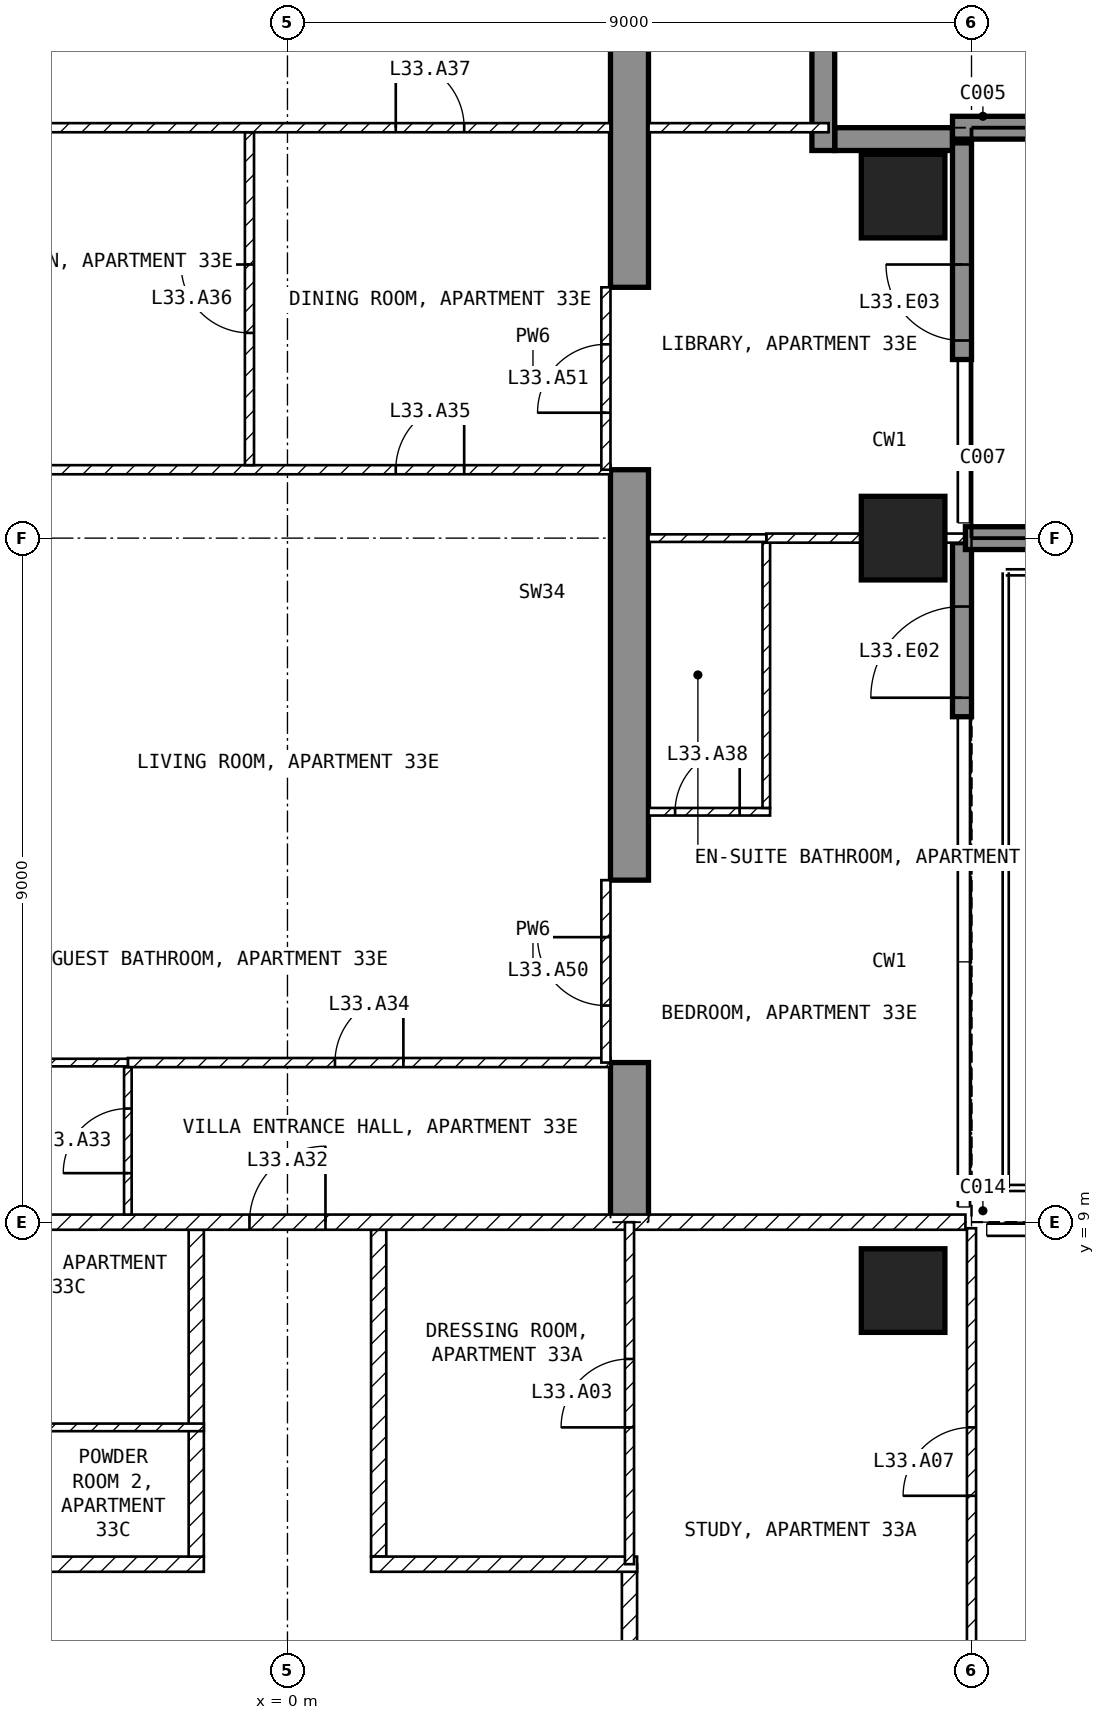
"""IFC4 building model, lengths in metres.
Left out: names, types, materials, properties, quantities, classifications, styles, units other than length and angle.
Written with IfcOpenShell. Run it as: python <this file> out.ifc"""

import sys

from ifc_helpers import new_model, si_unit, direction, frame, frame_2d, origin, origin_2d, place, context, subcontext, project, spatial, polyline, rectangle, outline, extrude, element, fill, save


model = new_model("IFC4")
c1 = context("Model", 3, precision=1e-05, world=origin(), true_north=direction((0.0, 1.0)))
c2 = subcontext(c1, "Body", "Model", "MODEL_VIEW")
j1 = project(units=[si_unit("LENGTHUNIT", "METRE"), si_unit("PLANEANGLEUNIT", "RADIAN")], contexts=[c1])
p1 = place(None, origin())
s1 = spatial("IfcSite", under=j1, at=p1, CompositionType="ELEMENT")
p2 = place(p1, origin())
s2 = spatial("IfcBuilding", under=s1, at=p2, CompositionType="ELEMENT")
p3 = place(p2, frame((0.0, 0.0, 137.4)))
s3 = spatial("IfcBuildingStorey", under=s2, at=p3, CompositionType="ELEMENT", Elevation=137.4)
for number, where, z_axis, x_axis in (
    (1, (8.1, 8.1, -0.25), (0.0, 0.0, 1.0), (1.0, 0.0, 0.0)),
    (2, (8.1, 18.0, -0.25), (0.0, 0.0, 1.0), (1.0, 0.0, 0.0)),
    (3, (8.1, 22.5, -0.25), (0.0, 0.0, 1.0), (1.0, 0.0, 0.0)),
):
    element("IfcColumn", number, at=place(p3, frame(where, z_axis=z_axis, x_axis=x_axis)), inside=s3, PredefinedType="COLUMN", context=c2, shape_type="SweptSolid", body=[
        extrude(rectangle(XDim=1.1, YDim=1.1, at=origin_2d()), origin(), (0.0, 0.0, 1.0), 3.5),
    ])
p4 = place(p3, frame((4.25, 9.0, -0.25), z_axis=(1.0, 0.0, 0.0), x_axis=(0.0, 1.0, 0.0)))
e4 = element("IfcWall", 4, at=p4, inside=s3, PredefinedType="SHEAR", context=c2, shape_type="SweptSolid", body=[
    extrude(outline(polyline([(0.0, 0.0), (2.1, 0.0), (2.1, 2.65), (4.5, 2.65), (4.5, 0.0), (9.9, 0.0), (9.9, 2.65), (12.3, 2.65), (12.3, 0.0), (16.55, 0.0), (16.55, 3.5), (0.0, 3.5), (0.0, 0.0)])), origin(), (0.0, 0.0, 1.0), 0.5),
])
p5 = place(p3, frame((8.875, 15.65, 0.0), z_axis=(0.0, 0.0, 1.0), x_axis=(0.0, 1.0, 0.0)))
e5 = element("IfcWall", 5, at=p5, inside=s3, PredefinedType="SOLIDWALL", context=c2, shape_type="SweptSolid", body=[
    extrude(rectangle(XDim=2.29, YDim=0.25, at=frame_2d((1.145, 0.0))), origin(), (0.0, 0.0, 1.0), 3.25),
])
p6 = place(p5, frame((0.25, 0.0, 0.0)))
e6 = element("IfcOpeningElement", 6, at=p6, cuts=e5, PredefinedType="OPENING", context=c2, shape_type="SweptSolid", body=[
    extrude(rectangle(XDim=1.2, YDim=2.4, at=frame_2d((0.6, 1.2))), frame((0.0, 0.135, 0.0), z_axis=(0.0, -1.0, 0.0), x_axis=(1.0, 0.0, 0.0)), (0.0, 0.0, 1.0), 0.27),
])
p7 = place(p3, frame((8.875, 20.35, 0.0), z_axis=(0.0, 0.0, 1.0), x_axis=(0.0, 1.0, 0.0)))
e7 = element("IfcWall", 7, at=p7, inside=s3, PredefinedType="SOLIDWALL", context=c2, shape_type="SweptSolid", body=[
    extrude(rectangle(XDim=2.85, YDim=0.25, at=frame_2d((1.425, 0.0))), origin(), (0.0, 0.0, 1.0), 3.25),
])
p8 = place(p7, frame((0.25, 0.0, 0.0)))
e8 = element("IfcOpeningElement", 8, at=p8, cuts=e7, PredefinedType="OPENING", context=c2, shape_type="SweptSolid", body=[
    extrude(rectangle(XDim=1.0, YDim=2.4, at=frame_2d((0.5, 1.2))), frame((0.0, 0.135, 0.0), z_axis=(0.0, -1.0, 0.0), x_axis=(1.0, 0.0, 0.0)), (0.0, 0.0, 1.0), 0.27),
])
p9 = place(p3, frame((8.75, 23.25, 0.0), z_axis=(0.0, 0.0, 1.0), x_axis=(-1.0, 0.0, 0.0)))
e9 = element("IfcWall", 9, at=p9, inside=s3, PredefinedType="SOLIDWALL", context=c2, shape_type="SweptSolid", body=[
    extrude(rectangle(XDim=1.55, YDim=0.3, at=frame_2d((0.775, 0.0))), origin(), (0.0, 0.0, 1.0), 3.25),
])
p10 = place(p3, frame((7.05, 23.1, 0.0), z_axis=(0.0, 0.0, 1.0), x_axis=(0.0, 1.0, 0.0)))
e10 = element("IfcWall", 10, at=p10, inside=s3, PredefinedType="SOLIDWALL", context=c2, shape_type="SweptSolid", body=[
    extrude(rectangle(XDim=1.8, YDim=0.3, at=frame_2d((0.9, 0.0))), origin(), (0.0, 0.0, 1.0), 3.25),
])
p11 = place(p3, frame((8.92, 18.0, 0.0), z_axis=(0.0, 0.0, 1.0), x_axis=(1.0, 0.0, 0.0)))
e11 = element("IfcWall", 11, at=p11, inside=s3, PredefinedType="SOLIDWALL", context=c2, shape_type="SweptSolid", body=[
    extrude(rectangle(XDim=2.82, YDim=0.3, at=frame_2d((1.41, 0.0))), origin(), (0.0, 0.0, 1.0), 3.25),
])
p12 = place(p3, frame((8.75, 23.4, 0.0), z_axis=(0.0, 0.0, 1.0), x_axis=(1.0, 0.0, 0.0)))
e12 = element("IfcWall", 12, at=p12, inside=s3, PredefinedType="SOLIDWALL", context=c2, shape_type="SweptSolid", body=[
    extrude(rectangle(XDim=2.95, YDim=0.3, at=frame_2d((1.475, 0.0))), origin(), (0.0, 0.0, 1.0), 3.25),
])
p13 = place(p3, frame((4.5, 4.5, 0.0), z_axis=(0.0, 0.0, 1.0), x_axis=(0.0, -1.0, 0.0)))
e13 = element("IfcWall", 13, at=p13, inside=s3, PredefinedType="PARTITIONING", context=c2, shape_type="SweptSolid", body=[
    extrude(rectangle(XDim=3.2, YDim=0.2, at=frame_2d((1.6, 0.0))), origin(), (0.0, 0.0, 1.0), 3.25),
])
p14 = place(p3, frame((1.2, 8.9, 0.0), z_axis=(0.0, 0.0, 1.0), x_axis=(0.0, -1.0, 0.0)))
e14 = element("IfcWall", 14, at=p14, inside=s3, PredefinedType="PARTITIONING", context=c2, shape_type="SweptSolid", body=[
    extrude(rectangle(XDim=4.3, YDim=0.2, at=frame_2d((2.15, 0.0))), origin(), (0.0, 0.0, 1.0), 3.25),
])
for number, where, z_axis, x_axis in (
    (15, (1.1, 4.5, 0.0), (0.0, 0.0, 1.0), (1.0, 0.0, 0.0)),
    (16, (-4.6, 4.5, 0.0), (0.0, 0.0, 1.0), (1.0, 0.0, 0.0)),
):
    element("IfcWall", number, at=place(p3, frame(where, z_axis=z_axis, x_axis=x_axis)), inside=s3, PredefinedType="PARTITIONING", context=c2, shape_type="SweptSolid", body=[
        extrude(rectangle(XDim=3.5, YDim=0.2, at=frame_2d((1.75, 0.0))), origin(), (0.0, 0.0, 1.0), 3.25),
    ])
p15 = place(p3, frame((-1.2, 4.6, 0.0), z_axis=(0.0, 0.0, 1.0), x_axis=(0.0, 1.0, 0.0)))
e17 = element("IfcWall", 17, at=p15, inside=s3, PredefinedType="PARTITIONING", context=c2, shape_type="SweptSolid", body=[
    extrude(rectangle(XDim=4.3, YDim=0.2, at=frame_2d((2.15, 0.0))), origin(), (0.0, 0.0, 1.0), 3.25),
])
p16 = place(p3, frame((-8.92, 9.0, 0.0), z_axis=(0.0, 0.0, 1.0), x_axis=(1.0, 0.0, 0.0)))
e18 = element("IfcWall", 18, at=p16, inside=s3, PredefinedType="PARTITIONING", context=c2, shape_type="SweptSolid", body=[
    extrude(rectangle(XDim=17.84, YDim=0.2, at=frame_2d((8.92, 0.0))), origin(), (0.0, 0.0, 1.0), 3.25),
])
p17 = place(p16, frame((8.42, 0.0, 0.0)))
e19 = element("IfcOpeningElement", 19, at=p17, cuts=e18, PredefinedType="OPENING", context=c2, shape_type="SweptSolid", body=[
    extrude(rectangle(XDim=1.0, YDim=2.1, at=frame_2d((0.5, 1.05))), frame((0.0, 0.11, 0.0), z_axis=(0.0, -1.0, 0.0), x_axis=(1.0, 0.0, 0.0)), (0.0, 0.0, 1.0), 0.22),
])
p18 = place(p3, frame((9.0, 1.3, 0.0), z_axis=(0.0, 0.0, 1.0), x_axis=(0.0, 1.0, 0.0)))
e20 = element("IfcWall", 20, at=p18, inside=s3, PredefinedType="PARTITIONING", context=c2, shape_type="SweptSolid", body=[
    extrude(rectangle(XDim=7.62, YDim=0.12, at=frame_2d((3.81, 0.0))), origin(), (0.0, 0.0, 1.0), 3.25),
])
p19 = place(p18, frame((4.1, 0.0, 0.0)))
e21 = element("IfcOpeningElement", 21, at=p19, cuts=e20, PredefinedType="OPENING", context=c2, shape_type="SweptSolid", body=[
    extrude(rectangle(XDim=0.9, YDim=2.1, at=frame_2d((0.45, 1.05))), frame((0.0, 0.07, 0.0), z_axis=(0.0, -1.0, 0.0), x_axis=(1.0, 0.0, 0.0)), (0.0, 0.0, 1.0), 0.14),
])
p20 = place(p3, frame((4.5, 4.5, 0.0), z_axis=(0.0, 0.0, 1.0), x_axis=(0.0, 1.0, 0.0)))
e22 = element("IfcWall", 22, at=p20, inside=s3, PredefinedType="PARTITIONING", context=c2, shape_type="SweptSolid", body=[
    extrude(rectangle(XDim=4.5, YDim=0.12, at=frame_2d((2.25, 0.0))), origin(), (0.0, 0.0, 1.0), 3.25),
])
p21 = place(p20, frame((1.8, 0.0, 0.0)))
e23 = element("IfcOpeningElement", 23, at=p21, cuts=e22, PredefinedType="OPENING", context=c2, shape_type="SweptSolid", body=[
    extrude(rectangle(XDim=0.9, YDim=2.1, at=frame_2d((0.45, 1.05))), frame((0.0, 0.07, 0.0), z_axis=(0.0, -1.0, 0.0), x_axis=(1.0, 0.0, 0.0)), (0.0, 0.0, 1.0), 0.14),
])
p22 = place(p3, frame((-4.56, 6.3, 0.0), z_axis=(0.0, 0.0, 1.0), x_axis=(1.0, 0.0, 0.0)))
e24 = element("IfcWall", 24, at=p22, inside=s3, PredefinedType="PARTITIONING", context=c2, shape_type="SweptSolid", body=[
    extrude(rectangle(XDim=3.46, YDim=0.1, at=frame_2d((1.73, 0.0))), origin(), (0.0, 0.0, 1.0), 3.25),
])
p23 = place(p3, frame((-2.1, 9.1, 0.0), z_axis=(0.0, 0.0, 1.0), x_axis=(0.0, 1.0, 0.0)))
e25 = element("IfcWall", 25, at=p23, inside=s3, PredefinedType="PARTITIONING", context=c2, shape_type="SweptSolid", body=[
    extrude(rectangle(XDim=1.94, YDim=0.1, at=frame_2d((0.97, 0.0))), origin(), (0.0, 0.0, 1.0), 3.25),
])
p24 = place(p23, frame((0.545, 0.0, 0.0)))
e26 = element("IfcOpeningElement", 26, at=p24, cuts=e25, PredefinedType="OPENING", context=c2, shape_type="SweptSolid", body=[
    extrude(rectangle(XDim=0.85, YDim=2.1, at=frame_2d((0.425, 1.05))), frame((0.0, 0.06, 0.0), z_axis=(0.0, -1.0, 0.0), x_axis=(1.0, 0.0, 0.0)), (0.0, 0.0, 1.0), 0.12),
])
p25 = place(p3, frame((-2.1, 11.1, 0.0), z_axis=(0.0, 0.0, 1.0), x_axis=(1.0, 0.0, 0.0)))
e27 = element("IfcWall", 27, at=p25, inside=s3, PredefinedType="PARTITIONING", context=c2, shape_type="SweptSolid", body=[
    extrude(rectangle(XDim=6.35, YDim=0.12, at=frame_2d((3.175, 0.0))), origin(), (0.0, 0.0, 1.0), 3.25),
])
p26 = place(p25, frame((2.725, 0.0, 0.0)))
e28 = element("IfcOpeningElement", 28, at=p26, cuts=e27, PredefinedType="OPENING", context=c2, shape_type="SweptSolid", body=[
    extrude(rectangle(XDim=0.9, YDim=2.1, at=frame_2d((0.45, 1.05))), frame((0.0, 0.07, 0.0), z_axis=(0.0, -1.0, 0.0), x_axis=(1.0, 0.0, 0.0)), (0.0, 0.0, 1.0), 0.14),
])
p27 = place(p3, frame((-4.25, 11.1, 0.0), z_axis=(0.0, 0.0, 1.0), x_axis=(1.0, 0.0, 0.0)))
e29 = element("IfcWall", 29, at=p27, inside=s3, PredefinedType="PARTITIONING", context=c2, shape_type="SweptSolid", body=[
    extrude(rectangle(XDim=2.15, YDim=0.1, at=frame_2d((1.075, 0.0))), origin(), (0.0, 0.0, 1.0), 3.25),
])
p28 = place(p3, frame((-4.25, 18.9, 0.0), z_axis=(0.0, 0.0, 1.0), x_axis=(1.0, 0.0, 0.0)))
e30 = element("IfcWall", 30, at=p28, inside=s3, PredefinedType="PARTITIONING", context=c2, shape_type="SweptSolid", body=[
    extrude(rectangle(XDim=8.5, YDim=0.12, at=frame_2d((4.25, 0.0))), origin(), (0.0, 0.0, 1.0), 3.25),
])
p29 = place(p28, frame((5.675, 0.0, 0.0)))
e31 = element("IfcOpeningElement", 31, at=p29, cuts=e30, PredefinedType="OPENING", context=c2, shape_type="SweptSolid", body=[
    extrude(rectangle(XDim=0.9, YDim=2.1, at=frame_2d((0.45, 1.05))), frame((0.0, 0.07, 0.0), z_axis=(0.0, -1.0, 0.0), x_axis=(1.0, 0.0, 0.0)), (0.0, 0.0, 1.0), 0.14),
])
p30 = place(p3, frame((-0.5, 18.96, 0.0), z_axis=(0.0, 0.0, 1.0), x_axis=(0.0, 1.0, 0.0)))
e32 = element("IfcWall", 32, at=p30, inside=s3, PredefinedType="PARTITIONING", context=c2, shape_type="SweptSolid", body=[
    extrude(rectangle(XDim=4.38, YDim=0.12, at=frame_2d((2.19, 0.0))), origin(), (0.0, 0.0, 1.0), 3.25),
])
p31 = place(p30, frame((1.74, 0.0, 0.0)))
e33 = element("IfcOpeningElement", 33, at=p31, cuts=e32, PredefinedType="OPENING", context=c2, shape_type="SweptSolid", body=[
    extrude(rectangle(XDim=0.9, YDim=2.1, at=frame_2d((0.45, 1.05))), frame((0.0, 0.07, 0.0), z_axis=(0.0, -1.0, 0.0), x_axis=(1.0, 0.0, 0.0)), (0.0, 0.0, 1.0), 0.14),
])
p32 = place(p3, frame((-4.25, 23.4, 0.0), z_axis=(0.0, 0.0, 1.0), x_axis=(1.0, 0.0, 0.0)))
e34 = element("IfcWall", 34, at=p32, inside=s3, PredefinedType="PARTITIONING", context=c2, shape_type="SweptSolid", body=[
    extrude(rectangle(XDim=8.5, YDim=0.12, at=frame_2d((4.25, 0.0))), origin(), (0.0, 0.0, 1.0), 3.25),
])
p33 = place(p32, frame((5.675, 0.0, 0.0)))
e35 = element("IfcOpeningElement", 35, at=p33, cuts=e34, PredefinedType="OPENING", context=c2, shape_type="SweptSolid", body=[
    extrude(rectangle(XDim=0.9, YDim=2.1, at=frame_2d((0.45, 1.05))), frame((0.0, 0.07, 0.0), z_axis=(0.0, -1.0, 0.0), x_axis=(1.0, 0.0, 0.0)), (0.0, 0.0, 1.0), 0.14),
])
p34 = place(p3, frame((4.75, 14.4, 0.0), z_axis=(0.0, 0.0, 1.0), x_axis=(1.0, 0.0, 0.0)))
e36 = element("IfcWall", 36, at=p34, inside=s3, PredefinedType="PARTITIONING", context=c2, shape_type="SweptSolid", body=[
    extrude(rectangle(XDim=1.6, YDim=0.1, at=frame_2d((0.8, 0.0))), origin(), (0.0, 0.0, 1.0), 3.25),
])
p35 = place(p34, frame((0.35, 0.0, 0.0)))
e37 = element("IfcOpeningElement", 37, at=p35, cuts=e36, PredefinedType="OPENING", context=c2, shape_type="SweptSolid", body=[
    extrude(rectangle(XDim=0.85, YDim=2.1, at=frame_2d((0.425, 1.05))), frame((0.0, 0.06, 0.0), z_axis=(0.0, -1.0, 0.0), x_axis=(1.0, 0.0, 0.0)), (0.0, 0.0, 1.0), 0.12),
])
p36 = place(p3, frame((6.3, 14.45, 0.0), z_axis=(0.0, 0.0, 1.0), x_axis=(0.0, 1.0, 0.0)))
e38 = element("IfcWall", 38, at=p36, inside=s3, PredefinedType="PARTITIONING", context=c2, shape_type="SweptSolid", body=[
    extrude(rectangle(XDim=3.49, YDim=0.1, at=frame_2d((1.745, 0.0))), origin(), (0.0, 0.0, 1.0), 3.25),
])
p37 = place(p3, frame((6.3, 18.0, 0.0), z_axis=(0.0, 0.0, 1.0), x_axis=(1.0, 0.0, 0.0)))
e39 = element("IfcWall", 39, at=p37, inside=s3, PredefinedType="PARTITIONING", context=c2, shape_type="SweptSolid", body=[
    extrude(rectangle(XDim=2.62, YDim=0.12, at=frame_2d((1.31, 0.0))), origin(), (0.0, 0.0, 1.0), 2.414),
])
p38 = place(p3, frame((4.75, 18.0, 0.0), z_axis=(0.0, 0.0, 1.0), x_axis=(1.0, 0.0, 0.0)))
e40 = element("IfcWall", 40, at=p38, inside=s3, PredefinedType="PARTITIONING", context=c2, shape_type="SweptSolid", body=[
    extrude(rectangle(XDim=1.55, YDim=0.1, at=frame_2d((0.775, 0.0))), origin(), (0.0, 0.0, 1.0), 2.414),
])
p39 = place(p3, frame((4.75, 23.4, 0.0), z_axis=(0.0, 0.0, 1.0), x_axis=(1.0, 0.0, 0.0)))
e41 = element("IfcWall", 41, at=p39, inside=s3, PredefinedType="PARTITIONING", context=c2, shape_type="SweptSolid", body=[
    extrude(rectangle(XDim=2.37, YDim=0.12, at=frame_2d((1.185, 0.0))), origin(), (0.0, 0.0, 1.0), 3.25),
])
p40 = place(p3, frame((4.19, 11.1, 0.0), z_axis=(0.0, 0.0, 1.0), x_axis=(0.0, 1.0, 0.0)))
e42 = element("IfcWall", 42, at=p40, inside=s3, PredefinedType="PARTITIONING", context=c2, shape_type="SweptSolid", body=[
    extrude(rectangle(XDim=2.4, YDim=0.12, at=frame_2d((1.2, 0.0))), origin(), (0.0, 0.0, 1.0), 2.4),
])
p41 = place(p40, frame((0.75, 0.0, 0.0)))
e43 = element("IfcOpeningElement", 43, at=p41, cuts=e42, PredefinedType="OPENING", context=c2, shape_type="SweptSolid", body=[
    extrude(rectangle(XDim=0.9, YDim=2.1, at=frame_2d((0.45, 1.05))), frame((0.0, 0.07, 0.0), z_axis=(0.0, -1.0, 0.0), x_axis=(1.0, 0.0, 0.0)), (0.0, 0.0, 1.0), 0.14),
])
p42 = place(p3, frame((4.19, 18.9, 0.0), z_axis=(0.0, 0.0, 1.0), x_axis=(0.0, 1.0, 0.0)))
e44 = element("IfcWall", 44, at=p42, inside=s3, PredefinedType="PARTITIONING", context=c2, shape_type="SweptSolid", body=[
    extrude(rectangle(XDim=2.4, YDim=0.12, at=frame_2d((1.2, 0.0))), origin(), (0.0, 0.0, 1.0), 2.4),
])
p43 = place(p42, frame((0.75, 0.0, 0.0)))
e45 = element("IfcOpeningElement", 45, at=p43, cuts=e44, PredefinedType="OPENING", context=c2, shape_type="SweptSolid", body=[
    extrude(rectangle(XDim=0.9, YDim=2.1, at=frame_2d((0.45, 1.05))), frame((0.0, 0.07, 0.0), z_axis=(0.0, -1.0, 0.0), x_axis=(1.0, 0.0, 0.0)), (0.0, 0.0, 1.0), 0.14),
])
p44 = place(p6, origin())
e46 = element("IfcDoor", 46, at=p44, inside=s3, OperationType="SINGLE_SWING_LEFT", PredefinedType="DOOR", context=c2, shape_type="SweptSolid", body=[
    extrude(rectangle(XDim=1.2, YDim=2.4, at=frame_2d((0.6, 1.2))), frame((0.0, 0.025, 0.0), z_axis=(0.0, -1.0, 0.0), x_axis=(1.0, 0.0, 0.0)), (0.0, 0.0, 1.0), 0.05),
])
fill(e6, e46)
p45 = place(p8, origin())
e47 = element("IfcDoor", 47, at=p45, inside=s3, OperationType="SINGLE_SWING_RIGHT", PredefinedType="DOOR", context=c2, shape_type="SweptSolid", body=[
    extrude(rectangle(XDim=1.0, YDim=2.4, at=frame_2d((0.5, 1.2))), frame((0.0, 0.025, 0.0), z_axis=(0.0, -1.0, 0.0), x_axis=(1.0, 0.0, 0.0)), (0.0, 0.0, 1.0), 0.05),
])
fill(e8, e47)
p46 = place(p21, origin())
e48 = element("IfcDoor", 48, at=p46, inside=s3, OperationType="SINGLE_SWING_LEFT", PredefinedType="DOOR", context=c2, shape_type="SweptSolid", body=[
    extrude(rectangle(XDim=0.9, YDim=2.1, at=frame_2d((0.45, 1.05))), frame((0.0, 0.025, 0.0), z_axis=(0.0, -1.0, 0.0), x_axis=(1.0, 0.0, 0.0)), (0.0, 0.0, 1.0), 0.05),
])
fill(e23, e48)
p47 = place(p19, origin())
e49 = element("IfcDoor", 49, at=p47, inside=s3, OperationType="SINGLE_SWING_LEFT", PredefinedType="DOOR", context=c2, shape_type="SweptSolid", body=[
    extrude(rectangle(XDim=0.9, YDim=2.1, at=frame_2d((0.45, 1.05))), frame((0.0, 0.025, 0.0), z_axis=(0.0, -1.0, 0.0), x_axis=(1.0, 0.0, 0.0)), (0.0, 0.0, 1.0), 0.05),
])
fill(e21, e49)
p48 = place(p17, origin())
e50 = element("IfcDoor", 50, at=p48, inside=s3, OperationType="SINGLE_SWING_RIGHT", PredefinedType="DOOR", context=c2, shape_type="SweptSolid", body=[
    extrude(rectangle(XDim=1.0, YDim=2.1, at=frame_2d((0.5, 1.05))), frame((0.0, 0.025, 0.0), z_axis=(0.0, -1.0, 0.0), x_axis=(1.0, 0.0, 0.0)), (0.0, 0.0, 1.0), 0.05),
])
fill(e19, e50)
p49 = place(p24, origin())
e51 = element("IfcDoor", 51, at=p49, inside=s3, OperationType="SINGLE_SWING_LEFT", PredefinedType="DOOR", context=c2, shape_type="SweptSolid", body=[
    extrude(rectangle(XDim=0.85, YDim=2.1, at=frame_2d((0.425, 1.05))), frame((0.0, 0.025, 0.0), z_axis=(0.0, -1.0, 0.0), x_axis=(1.0, 0.0, 0.0)), (0.0, 0.0, 1.0), 0.05),
])
fill(e26, e51)
p50 = place(p26, origin())
e52 = element("IfcDoor", 52, at=p50, inside=s3, OperationType="SINGLE_SWING_RIGHT", PredefinedType="DOOR", context=c2, shape_type="SweptSolid", body=[
    extrude(rectangle(XDim=0.9, YDim=2.1, at=frame_2d((0.45, 1.05))), frame((0.0, 0.025, 0.0), z_axis=(0.0, -1.0, 0.0), x_axis=(1.0, 0.0, 0.0)), (0.0, 0.0, 1.0), 0.05),
])
fill(e28, e52)
p51 = place(p29, origin())
e53 = element("IfcDoor", 53, at=p51, inside=s3, OperationType="SINGLE_SWING_RIGHT", PredefinedType="DOOR", context=c2, shape_type="SweptSolid", body=[
    extrude(rectangle(XDim=0.9, YDim=2.1, at=frame_2d((0.45, 1.05))), frame((0.0, 0.025, 0.0), z_axis=(0.0, -1.0, 0.0), x_axis=(1.0, 0.0, 0.0)), (0.0, 0.0, 1.0), 0.05),
])
fill(e31, e53)
p52 = place(p31, origin())
e54 = element("IfcDoor", 54, at=p52, inside=s3, OperationType="SINGLE_SWING_RIGHT", PredefinedType="DOOR", context=c2, shape_type="SweptSolid", body=[
    extrude(rectangle(XDim=0.9, YDim=2.1, at=frame_2d((0.45, 1.05))), frame((0.0, 0.025, 0.0), z_axis=(0.0, -1.0, 0.0), x_axis=(1.0, 0.0, 0.0)), (0.0, 0.0, 1.0), 0.05),
])
fill(e33, e54)
p53 = place(p33, origin())
e55 = element("IfcDoor", 55, at=p53, inside=s3, OperationType="SINGLE_SWING_LEFT", PredefinedType="DOOR", context=c2, shape_type="SweptSolid", body=[
    extrude(rectangle(XDim=0.9, YDim=2.1, at=frame_2d((0.45, 1.05))), frame((0.0, 0.025, 0.0), z_axis=(0.0, -1.0, 0.0), x_axis=(1.0, 0.0, 0.0)), (0.0, 0.0, 1.0), 0.05),
])
fill(e35, e55)
p54 = place(p35, origin())
e56 = element("IfcDoor", 56, at=p54, inside=s3, OperationType="SINGLE_SWING_RIGHT", PredefinedType="DOOR", context=c2, shape_type="SweptSolid", body=[
    extrude(rectangle(XDim=0.85, YDim=2.1, at=frame_2d((0.425, 1.05))), frame((0.0, 0.025, 0.0), z_axis=(0.0, -1.0, 0.0), x_axis=(1.0, 0.0, 0.0)), (0.0, 0.0, 1.0), 0.05),
])
fill(e37, e56)
p55 = place(p41, origin())
e57 = element("IfcDoor", 57, at=p55, inside=s3, OperationType="SINGLE_SWING_RIGHT", PredefinedType="DOOR", context=c2, shape_type="SweptSolid", body=[
    extrude(rectangle(XDim=0.9, YDim=2.1, at=frame_2d((0.45, 1.05))), frame((0.0, 0.025, 0.0), z_axis=(0.0, -1.0, 0.0), x_axis=(1.0, 0.0, 0.0)), (0.0, 0.0, 1.0), 0.05),
])
fill(e43, e57)
p56 = place(p43, origin())
e58 = element("IfcDoor", 58, at=p56, inside=s3, OperationType="SINGLE_SWING_LEFT", PredefinedType="DOOR", context=c2, shape_type="SweptSolid", body=[
    extrude(rectangle(XDim=0.9, YDim=2.1, at=frame_2d((0.45, 1.05))), frame((0.0, 0.025, 0.0), z_axis=(0.0, -1.0, 0.0), x_axis=(1.0, 0.0, 0.0)), (0.0, 0.0, 1.0), 0.05),
])
fill(e45, e58)
save(model, sys.argv[1])
